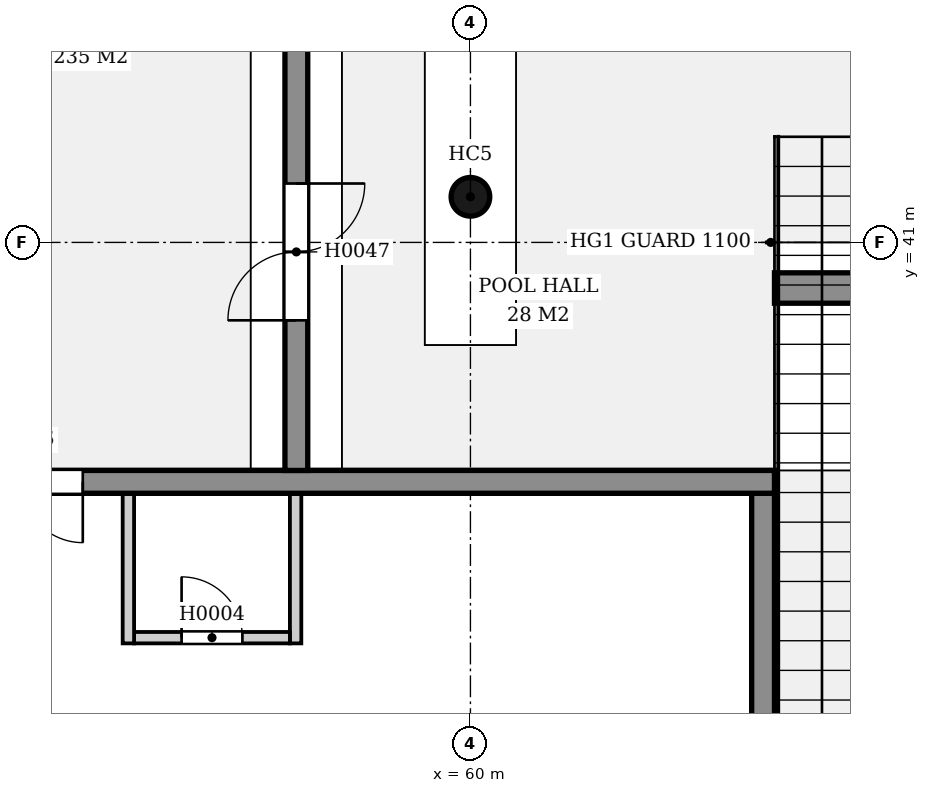
"""IFC4 building model, lengths in metres.
Left out: names, types, materials, properties, quantities, classifications, styles, units other than length and angle.
Written with IfcOpenShell. Run it as: python <this file> out.ifc"""

import sys

from ifc_helpers import new_model, si_unit, direction, frame, frame_2d, origin, origin_2d, place, context, subcontext, project, spatial, rectangle, hollow_circle, extrude, element, fill, save


model = new_model("IFC4")
c1 = context("Model", 3, precision=1e-05, world=origin(), true_north=direction((0.0, 1.0)))
c2 = subcontext(c1, "Body", "Model", "MODEL_VIEW")
j1 = project(units=[si_unit("LENGTHUNIT", "METRE"), si_unit("PLANEANGLEUNIT", "RADIAN")], contexts=[c1])
p1 = place(None, origin())
s1 = spatial("IfcSite", under=j1, at=p1, CompositionType="ELEMENT")
p2 = place(p1, origin())
s2 = spatial("IfcBuilding", under=s1, at=p2, CompositionType="ELEMENT")
p3 = place(p2, origin())
s3 = spatial("IfcBuildingStorey", under=s2, at=p3, CompositionType="ELEMENT", Elevation=0.0)
p4 = place(p3, frame((57.71, 38.0, 0.0), z_axis=(0.0, 0.0, 1.0), x_axis=(0.0, 1.0, 0.0)))
e1 = element("IfcWall", 1, at=p4, inside=s3, PredefinedType="SOLIDWALL", context=c2, shape_type="SweptSolid", body=[
    extrude(rectangle(XDim=46.0, YDim=0.3, at=frame_2d((23.0, 0.0))), origin(), (0.0, 0.0, 1.0), 5.0),
])
p5 = place(p4, frame((1.975, 0.0, 0.0)))
e2 = element("IfcOpeningElement", 2, at=p5, cuts=e1, PredefinedType="OPENING", context=c2, shape_type="SweptSolid", body=[
    extrude(rectangle(XDim=1.8, YDim=2.1, at=frame_2d((0.9, 1.05))), frame((0.0, 0.16, 0.0), z_axis=(0.0, -1.0, 0.0), x_axis=(1.0, 0.0, 0.0)), (0.0, 0.0, 1.0), 0.32),
])
p6 = place(p4, frame((7.725, 0.0, 0.0)))
e3 = element("IfcOpeningElement", 3, at=p6, cuts=e1, PredefinedType="OPENING", context=c2, shape_type="SweptSolid", body=[
    extrude(rectangle(XDim=1.8, YDim=2.1, at=frame_2d((0.9, 1.05))), frame((0.0, 0.16, 0.0), z_axis=(0.0, -1.0, 0.0), x_axis=(1.0, 0.0, 0.0)), (0.0, 0.0, 1.0), 0.32),
])
p7 = place(p4, frame((13.475, 0.0, 0.0)))
e4 = element("IfcOpeningElement", 4, at=p7, cuts=e1, PredefinedType="OPENING", context=c2, shape_type="SweptSolid", body=[
    extrude(rectangle(XDim=1.8, YDim=2.1, at=frame_2d((0.9, 1.05))), frame((0.0, 0.16, 0.0), z_axis=(0.0, -1.0, 0.0), x_axis=(1.0, 0.0, 0.0)), (0.0, 0.0, 1.0), 0.32),
])
p8 = place(p4, frame((19.225, 0.0, 0.0)))
e5 = element("IfcOpeningElement", 5, at=p8, cuts=e1, PredefinedType="OPENING", context=c2, shape_type="SweptSolid", body=[
    extrude(rectangle(XDim=1.8, YDim=2.1, at=frame_2d((0.9, 1.05))), frame((0.0, 0.16, 0.0), z_axis=(0.0, -1.0, 0.0), x_axis=(1.0, 0.0, 0.0)), (0.0, 0.0, 1.0), 0.32),
])
p9 = place(p4, frame((24.975, 0.0, 0.0)))
e6 = element("IfcOpeningElement", 6, at=p9, cuts=e1, PredefinedType="OPENING", context=c2, shape_type="SweptSolid", body=[
    extrude(rectangle(XDim=1.8, YDim=2.1, at=frame_2d((0.9, 1.05))), frame((0.0, 0.16, 0.0), z_axis=(0.0, -1.0, 0.0), x_axis=(1.0, 0.0, 0.0)), (0.0, 0.0, 1.0), 0.32),
])
p10 = place(p4, frame((30.725, 0.0, 0.0)))
e7 = element("IfcOpeningElement", 7, at=p10, cuts=e1, PredefinedType="OPENING", context=c2, shape_type="SweptSolid", body=[
    extrude(rectangle(XDim=1.8, YDim=2.1, at=frame_2d((0.9, 1.05))), frame((0.0, 0.16, 0.0), z_axis=(0.0, -1.0, 0.0), x_axis=(1.0, 0.0, 0.0)), (0.0, 0.0, 1.0), 0.32),
])
p11 = place(p4, frame((36.475, 0.0, 0.0)))
e8 = element("IfcOpeningElement", 8, at=p11, cuts=e1, PredefinedType="OPENING", context=c2, shape_type="SweptSolid", body=[
    extrude(rectangle(XDim=1.8, YDim=2.1, at=frame_2d((0.9, 1.05))), frame((0.0, 0.16, 0.0), z_axis=(0.0, -1.0, 0.0), x_axis=(1.0, 0.0, 0.0)), (0.0, 0.0, 1.0), 0.32),
])
p12 = place(p4, frame((42.225, 0.0, 0.0)))
e9 = element("IfcOpeningElement", 9, at=p12, cuts=e1, PredefinedType="OPENING", context=c2, shape_type="SweptSolid", body=[
    extrude(rectangle(XDim=1.8, YDim=2.1, at=frame_2d((0.9, 1.05))), frame((0.0, 0.16, 0.0), z_axis=(0.0, -1.0, 0.0), x_axis=(1.0, 0.0, 0.0)), (0.0, 0.0, 1.0), 0.32),
])
p13 = place(p3, frame((64.0, 40.4, -0.8), z_axis=(0.0, 0.0, 1.0), x_axis=(1.0, 0.0, 0.0)))
e10 = element("IfcWall", 10, at=p13, inside=s3, PredefinedType="SOLIDWALL", context=c2, shape_type="SweptSolid", body=[
    extrude(rectangle(XDim=76.0, YDim=0.4, at=frame_2d((38.0, 0.0))), origin(), (0.0, 0.0, 1.0), 1.66),
])
p14 = place(p3, frame((63.85, 26.45, -1.6), z_axis=(0.0, 0.0, 1.0), x_axis=(0.0, 1.0, 0.0)))
e11 = element("IfcWall", 11, at=p14, inside=s3, PredefinedType="SOLIDWALL", context=c2, shape_type="SweptSolid", body=[
    extrude(rectangle(XDim=11.25, YDim=0.3, at=frame_2d((5.625, 0.0))), origin(), (0.0, 0.0, 1.0), 1.35),
])
p15 = place(p3, frame((63.85, 26.45, 0.0), z_axis=(0.0, 0.0, 1.0), x_axis=(0.0, 1.0, 0.0)))
e12 = element("IfcWall", 12, at=p15, inside=s3, PredefinedType="SOLIDWALL", context=c2, shape_type="SweptSolid", body=[
    extrude(rectangle(XDim=11.25, YDim=0.3, at=frame_2d((5.625, 0.0))), origin(), (0.0, 0.0, 1.0), 5.0),
])
p16 = place(p15, frame((3.37, 0.0, 0.0)))
e13 = element("IfcOpeningElement", 13, at=p16, cuts=e12, PredefinedType="OPENING", context=c2, shape_type="SweptSolid", body=[
    extrude(rectangle(XDim=1.6, YDim=2.1, at=frame_2d((0.8, 1.05))), frame((0.0, 0.16, 0.0), z_axis=(0.0, -1.0, 0.0), x_axis=(1.0, 0.0, 0.0)), (0.0, 0.0, 1.0), 0.32),
])
p17 = place(p3, frame((52.45, 37.85, -1.6), z_axis=(0.0, 0.0, 1.0), x_axis=(1.0, 0.0, 0.0)))
e14 = element("IfcWall", 14, at=p17, inside=s3, PredefinedType="SOLIDWALL", context=c2, shape_type="SweptSolid", body=[
    extrude(rectangle(XDim=11.55, YDim=0.3, at=frame_2d((5.775, 0.0))), origin(), (0.0, 0.0, 1.0), 1.35),
])
p18 = place(p3, frame((52.45, 37.85, 0.0), z_axis=(0.0, 0.0, 1.0), x_axis=(1.0, 0.0, 0.0)))
e15 = element("IfcWall", 15, at=p18, inside=s3, PredefinedType="SOLIDWALL", context=c2, shape_type="SweptSolid", body=[
    extrude(rectangle(XDim=11.55, YDim=0.3, at=frame_2d((5.775, 0.0))), origin(), (0.0, 0.0, 1.0), 5.0),
])
p19 = place(p18, frame((0.85, 0.0, 0.0)))
e16 = element("IfcOpeningElement", 16, at=p19, cuts=e15, PredefinedType="OPENING", context=c2, shape_type="SweptSolid", body=[
    extrude(rectangle(XDim=1.6, YDim=2.1, at=frame_2d((0.8, 1.05))), frame((0.0, 0.16, 0.0), z_axis=(0.0, -1.0, 0.0), x_axis=(1.0, 0.0, 0.0)), (0.0, 0.0, 1.0), 0.32),
])
p20 = place(p3, frame((60.0, 41.6, 0.0), z_axis=(0.0, 0.0, 1.0), x_axis=(1.0, 0.0, 0.0)))
e17 = element("IfcColumn", 17, at=p20, inside=s3, PredefinedType="COLUMN", context=c2, shape_type="SweptSolid", body=[
    extrude(hollow_circle(Radius=0.254, WallThickness=0.016, at=origin_2d()), origin(), (0.0, 0.0, 1.0), 5.0),
])
p21 = place(p3, frame((55.575, 35.8, 0.0), z_axis=(0.0, 0.0, 1.0), x_axis=(1.0, 0.0, 0.0)))
e18 = element("IfcWall", 18, at=p21, inside=s3, PredefinedType="PARTITIONING", context=c2, shape_type="SweptSolid", body=[
    extrude(rectangle(XDim=2.05, YDim=0.15, at=frame_2d((1.025, 0.0))), origin(), (0.0, 0.0, 1.0), 4.75),
])
p22 = place(p21, frame((0.625, 0.0, 0.0)))
e19 = element("IfcOpeningElement", 19, at=p22, cuts=e18, PredefinedType="OPENING", context=c2, shape_type="SweptSolid", body=[
    extrude(rectangle(XDim=0.8, YDim=2.1, at=frame_2d((0.4, 1.05))), frame((0.0, 0.085, 0.0), z_axis=(0.0, -1.0, 0.0), x_axis=(1.0, 0.0, 0.0)), (0.0, 0.0, 1.0), 0.17),
])
for number, where, z_axis, x_axis in (
    (20, (55.5, 35.725, 0.0), (0.0, 0.0, 1.0), (0.0, 1.0, 0.0)),
    (21, (57.7, 35.725, 0.0), (0.0, 0.0, 1.0), (0.0, 1.0, 0.0)),
):
    element("IfcWall", number, at=place(p3, frame(where, z_axis=z_axis, x_axis=x_axis)), inside=s3, PredefinedType="PARTITIONING", context=c2, shape_type="SweptSolid", body=[
        extrude(rectangle(XDim=1.975, YDim=0.15, at=frame_2d((0.987, 0.0))), origin(), (0.0, 0.0, 1.0), 4.75),
    ])
p23 = place(p22, origin())
e22 = element("IfcDoor", 22, at=p23, inside=s3, OperationType="SINGLE_SWING_LEFT", PredefinedType="DOOR", context=c2, shape_type="SweptSolid", body=[
    extrude(rectangle(XDim=0.8, YDim=2.1, at=frame_2d((0.4, 1.05))), frame((0.0, 0.025, 0.0), z_axis=(0.0, -1.0, 0.0), x_axis=(1.0, 0.0, 0.0)), (0.0, 0.0, 1.0), 0.05),
])
fill(e19, e22)
p24 = place(p19, origin())
e23 = element("IfcDoor", 23, at=p24, inside=s3, OperationType="DOUBLE_DOOR_SINGLE_SWING", PredefinedType="DOOR", context=c2, shape_type="SweptSolid", body=[
    extrude(rectangle(XDim=1.6, YDim=2.1, at=frame_2d((0.8, 1.05))), frame((0.0, 0.025, 0.0), z_axis=(0.0, -1.0, 0.0), x_axis=(1.0, 0.0, 0.0)), (0.0, 0.0, 1.0), 0.05),
])
fill(e16, e23)
p25 = place(p5, origin())
e24 = element("IfcDoor", 24, at=p25, inside=s3, OperationType="DOUBLE_DOOR_SINGLE_SWING", PredefinedType="DOOR", context=c2, shape_type="SweptSolid", body=[
    extrude(rectangle(XDim=1.8, YDim=2.1, at=frame_2d((0.9, 1.05))), frame((0.0, 0.025, 0.0), z_axis=(0.0, -1.0, 0.0), x_axis=(1.0, 0.0, 0.0)), (0.0, 0.0, 1.0), 0.05),
])
fill(e2, e24)
save(model, sys.argv[1])
